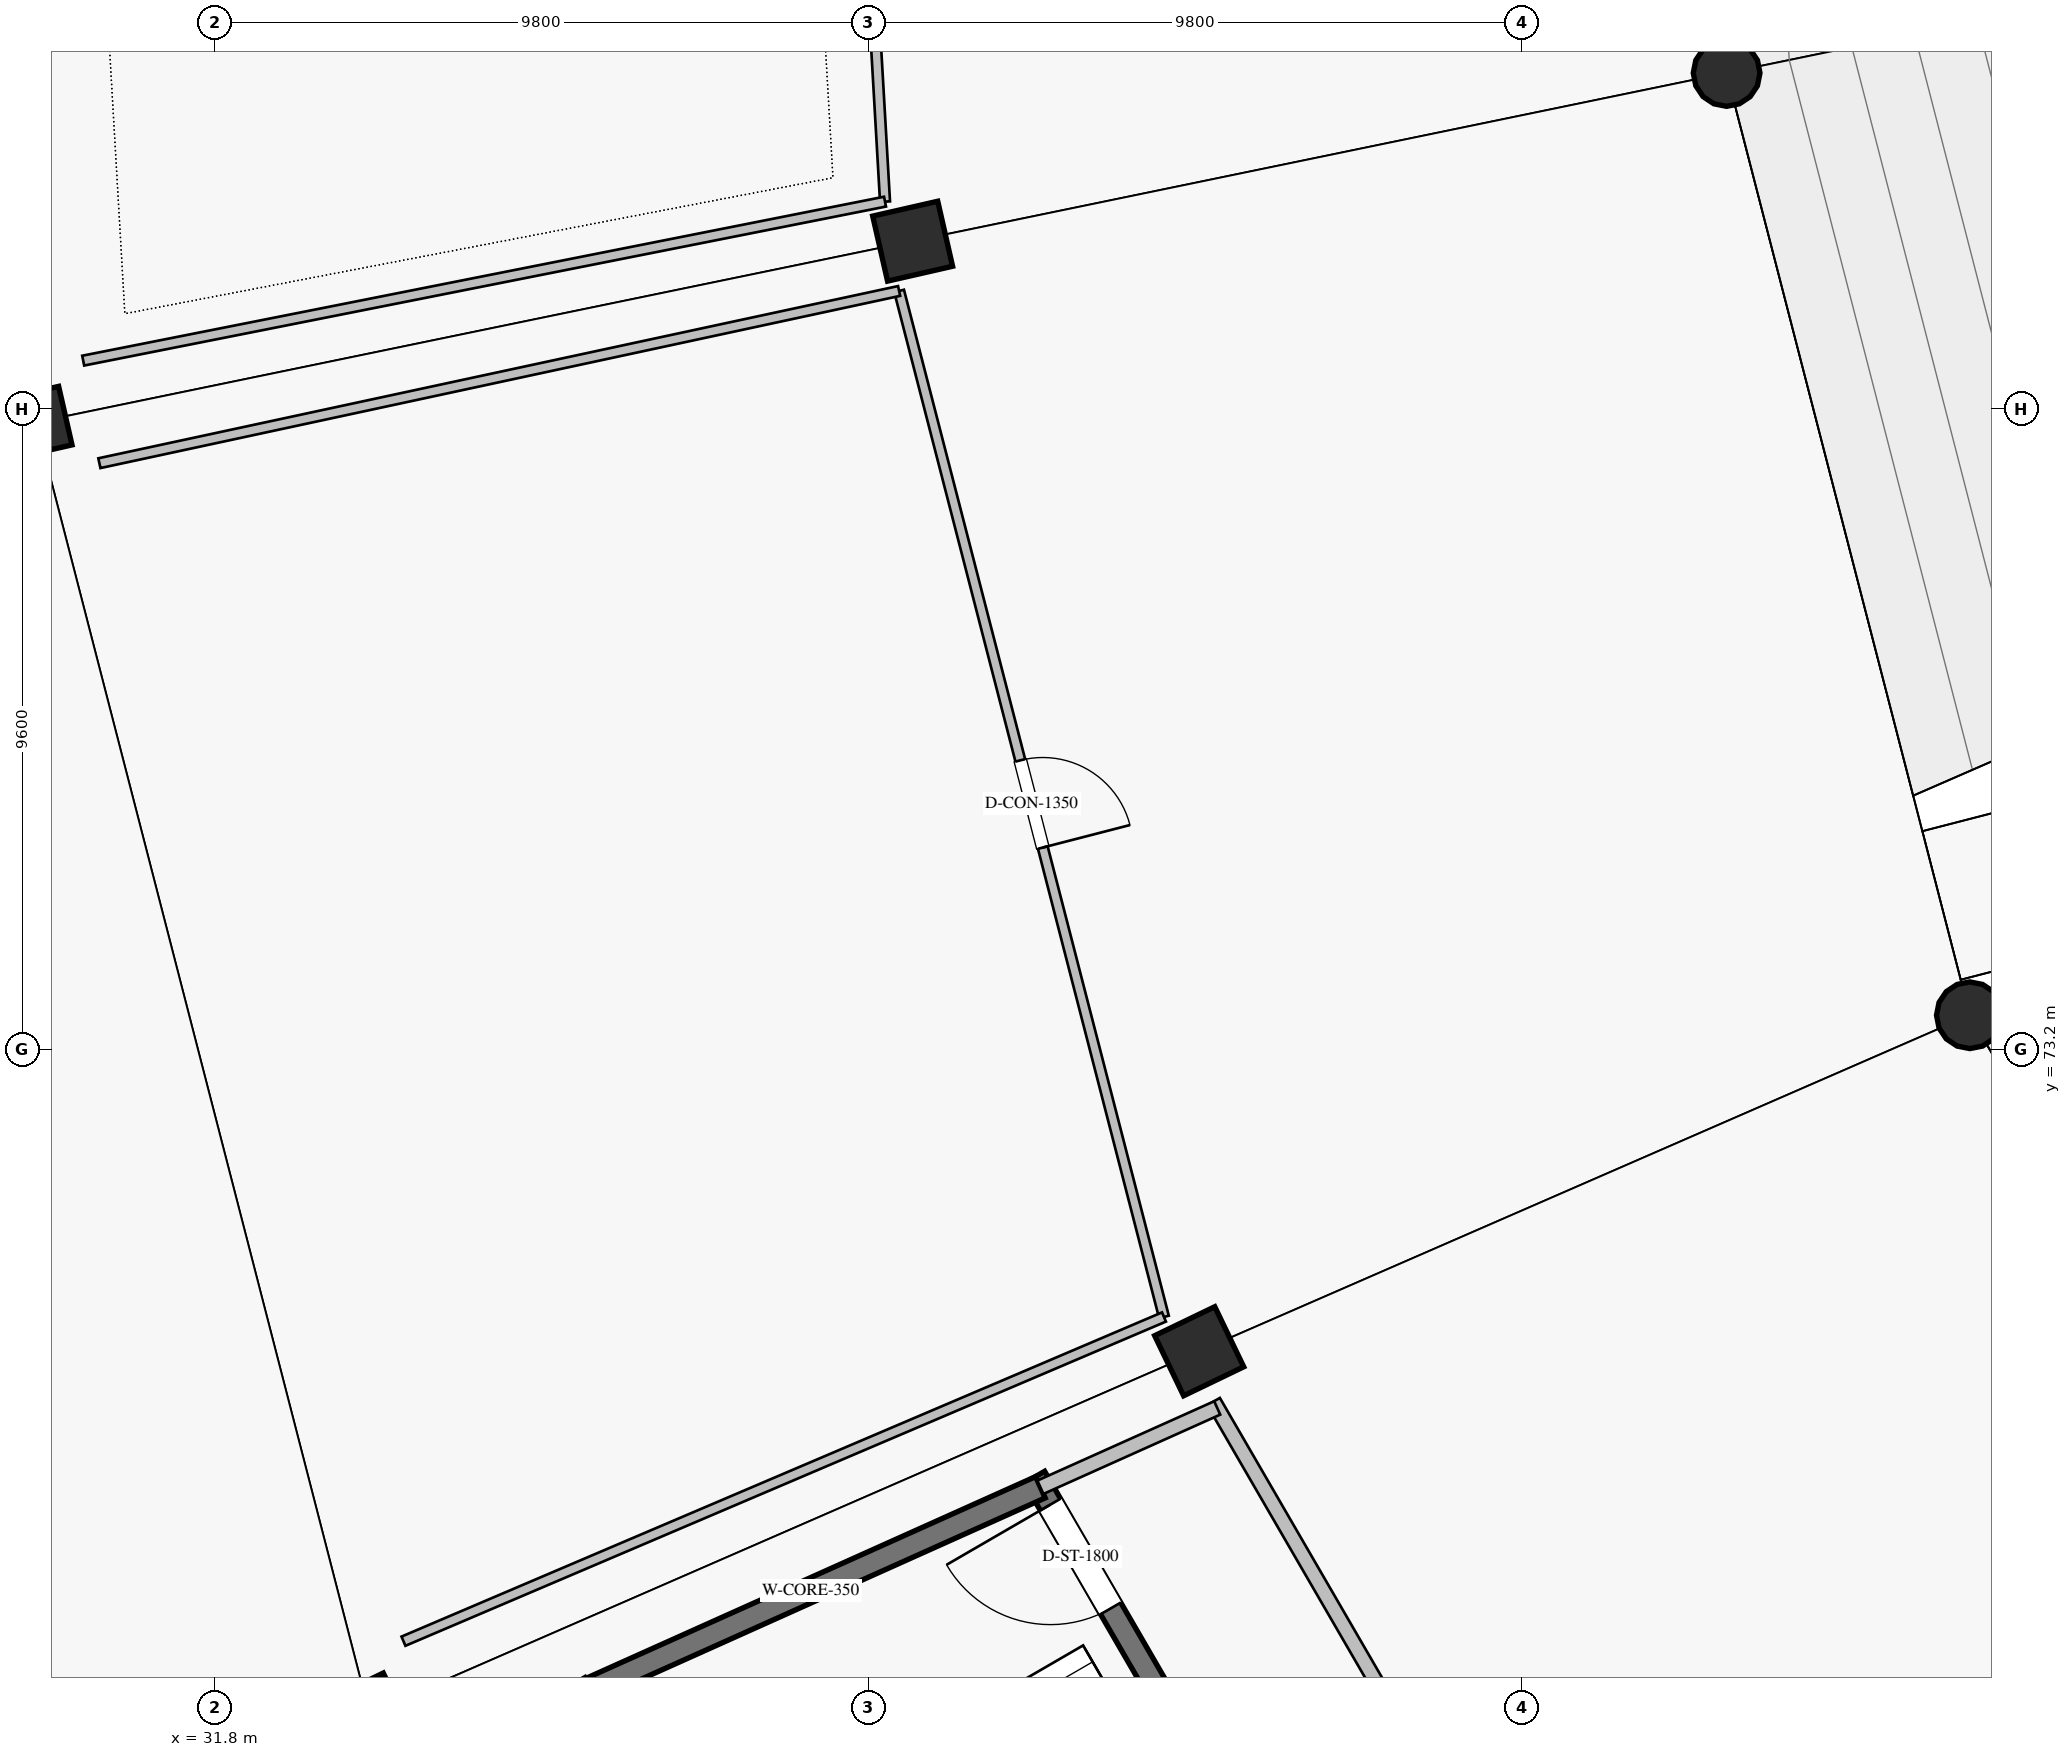
"""IFC4 building model, lengths in metres.
Left out: names, types, materials, properties, quantities, classifications, styles, units other than length and angle.
Written with IfcOpenShell. Run it as: python <this file> out.ifc"""

import sys

from ifc_helpers import new_model, si_unit, direction, frame, frame_2d, origin, origin_2d, place, context, subcontext, project, spatial, rectangle, circle, extrude, element, fill, save


model = new_model("IFC4")
c1 = context("Model", 3, precision=1e-05, world=origin(), true_north=direction((0.0, 1.0)))
c2 = subcontext(c1, "Body", "Model", "MODEL_VIEW")
j1 = project(units=[si_unit("LENGTHUNIT", "METRE"), si_unit("PLANEANGLEUNIT", "RADIAN")], contexts=[c1])
p1 = place(None, origin())
s1 = spatial("IfcSite", under=j1, at=p1, CompositionType="ELEMENT")
p2 = place(p1, origin())
s2 = spatial("IfcBuilding", under=s1, at=p2, CompositionType="ELEMENT")
p3 = place(p2, frame((0.0, 0.0, 5.78)))
s3 = spatial("IfcBuildingStorey", under=s2, at=p3, CompositionType="ELEMENT", Elevation=5.78)
for number, where, z_axis, x_axis in (
    (1, (54.467, 87.84, 0.0), (0.0, 0.0, 1.0), (-0.975, -0.223, 0.0)),
    (2, (58.114, 73.713, 0.0), (0.0, 0.0, 1.0), (-0.901, -0.434, 0.0)),
):
    element("IfcColumn", number, at=place(p3, frame(where, z_axis=z_axis, x_axis=x_axis)), inside=s3, PredefinedType="COLUMN", context=c2, shape_type="SweptSolid", body=[
        extrude(circle(Radius=0.5, at=origin_2d()), origin(), (0.0, 0.0, 1.0), 4.76),
    ])
for number, where, z_axis, x_axis in (
    (3, (42.262, 85.318, 0.0), (0.0, 0.0, 1.0), (-0.975, -0.223, 0.0)),
    (4, (46.559, 68.675, 0.0), (0.0, 0.0, 1.0), (-0.901, -0.434, 0.0)),
):
    element("IfcColumn", number, at=place(p3, frame(where, z_axis=z_axis, x_axis=x_axis)), inside=s3, PredefinedType="COLUMN", context=c2, shape_type="SweptSolid", body=[
        extrude(rectangle(XDim=1.0, YDim=1.0, at=origin_2d()), origin(), (0.0, 0.0, 1.0), 4.76),
    ])
for number, where, z_axis, x_axis in (
    (5, (29.119, 82.602, 0.0), (0.0, 0.0, 1.0), (-0.975, -0.223, 0.0)),
    (6, (34.115, 63.25, 0.0), (0.0, 0.0, 1.0), (-0.901, -0.434, 0.0)),
):
    element("IfcColumn", number, at=place(p3, frame(where, z_axis=z_axis, x_axis=x_axis)), inside=s3, PredefinedType="COLUMN", context=c2, shape_type="SweptSolid", body=[
        extrude(rectangle(XDim=0.9, YDim=0.9, at=origin_2d()), origin(), (0.0, 0.0, 1.0), 4.76),
    ])
p4 = place(p3, frame((44.09, 66.788, 0.0), z_axis=(0.0, 0.0, 1.0), x_axis=(0.501628624814, -0.865083072755, 0.0)))
e7 = element("IfcWall", 7, at=p4, inside=s3, PredefinedType="SHEAR", context=c2, shape_type="SweptSolid", body=[
    extrude(rectangle(XDim=11.435, YDim=0.35, at=frame_2d((5.718, 0.0))), origin(), (0.0, 0.0, 1.0), 4.5),
])
p5 = place(p4, frame((0.475, 0.0, 0.0)))
e8 = element("IfcOpeningElement", 8, at=p5, cuts=e7, PredefinedType="OPENING", context=c2, shape_type="SweptSolid", body=[
    extrude(rectangle(XDim=1.8, YDim=2.2, at=frame_2d((0.9, 1.1))), frame((0.0, 0.185, 0.0), z_axis=(0.0, -1.0, 0.0), x_axis=(1.0, 0.0, 0.0)), (0.0, 0.0, 1.0), 0.37),
])
p6 = place(p3, frame((44.178, 66.636, 0.0), z_axis=(0.0, 0.0, 1.0), x_axis=(-0.912385324524, -0.409332407212, 0.0)))
e9 = element("IfcWall", 9, at=p6, inside=s3, PredefinedType="SHEAR", context=c2, shape_type="SweptSolid", body=[
    extrude(rectangle(XDim=7.554, YDim=0.35, at=frame_2d((3.777, 0.0))), origin(), (0.0, 0.0, 1.0), 4.5),
])
p7 = place(p3, frame((46.774, 67.921, 0.0), z_axis=(0.0, 0.0, 1.0), x_axis=(0.501612626242, -0.865092349518, 0.0)))
e10 = element("IfcWall", 10, at=p7, inside=s3, PredefinedType="SOLIDWALL", context=c2, shape_type="SweptSolid", body=[
    extrude(rectangle(XDim=16.11, YDim=0.22, at=frame_2d((8.055, 0.0))), origin(), (0.0, 0.0, 1.0), 3.448),
])
p8 = place(p7, frame((6.511, 0.0, 0.0)))
e11 = element("IfcOpeningElement", 11, at=p8, cuts=e10, PredefinedType="OPENING", context=c2, shape_type="SweptSolid", body=[
    extrude(rectangle(XDim=1.5, YDim=2.2, at=frame_2d((0.75, 1.1))), frame((0.0, 0.12, 0.0), z_axis=(0.0, -1.0, 0.0), x_axis=(1.0, 0.0, 0.0)), (0.0, 0.0, 1.0), 0.24),
])
p9 = place(p3, frame((46.829, 67.826, 0.0), z_axis=(0.0, 0.0, 1.0), x_axis=(-0.912378422162, -0.409347791949, 0.0)))
e12 = element("IfcWall", 12, at=p9, inside=s3, PredefinedType="SOLIDWALL", context=c2, shape_type="SweptSolid", body=[
    extrude(rectangle(XDim=2.906, YDim=0.22, at=frame_2d((1.453, 0.0))), origin(), (0.0, 0.0, 1.0), 4.5),
])
p10 = place(p3, frame((40.959, 101.33, 0.0), z_axis=(0.0, 0.0, 1.0), x_axis=(0.057603503798, -0.998339539611, 0.0)))
e13 = element("IfcWall", 13, at=p10, inside=s3, PredefinedType="PARTITIONING", context=c2, shape_type="SweptSolid", body=[
    extrude(rectangle(XDim=15.444, YDim=0.15, at=frame_2d((7.722, 0.0))), origin(), (0.0, 0.0, 1.0), 3.82),
])
p11 = place(p10, frame((7.247, 0.0, 0.0)))
e14 = element("IfcOpeningElement", 14, at=p11, cuts=e13, PredefinedType="OPENING", context=c2, shape_type="SweptSolid", body=[
    extrude(rectangle(XDim=0.95, YDim=2.15, at=frame_2d((0.475, 1.075))), frame((0.0, 0.085, 0.0), z_axis=(0.0, -1.0, 0.0), x_axis=(1.0, 0.0, 0.0)), (0.0, 0.0, 1.0), 0.17),
])
p12 = place(p3, frame((41.848, 85.911, 0.0), z_axis=(0.0, 0.0, 1.0), x_axis=(-0.980904167784, -0.194491680088, 0.0)))
e15 = element("IfcWall", 15, at=p12, inside=s3, PredefinedType="PARTITIONING", context=c2, shape_type="SweptSolid", body=[
    extrude(rectangle(XDim=12.257, YDim=0.15, at=frame_2d((6.128, 0.0))), origin(), (0.0, 0.0, 1.0), 3.82),
])
p13 = place(p3, frame((42.06, 84.572, 0.0), z_axis=(0.0, 0.0, 1.0), x_axis=(0.249970043824, -0.968253570709, 0.0)))
e16 = element("IfcWall", 16, at=p13, inside=s3, PredefinedType="PARTITIONING", context=c2, shape_type="SweptSolid", body=[
    extrude(rectangle(XDim=15.887, YDim=0.15, at=frame_2d((7.943, 0.0))), origin(), (0.0, 0.0, 1.0), 3.82),
])
p14 = place(p13, frame((7.268, 0.0, 0.0)))
e17 = element("IfcOpeningElement", 17, at=p14, cuts=e16, PredefinedType="OPENING", context=c2, shape_type="SweptSolid", body=[
    extrude(rectangle(XDim=1.35, YDim=2.15, at=frame_2d((0.675, 1.075))), frame((0.0, 0.085, 0.0), z_axis=(0.0, -1.0, 0.0), x_axis=(1.0, 0.0, 0.0)), (0.0, 0.0, 1.0), 0.17),
])
p15 = place(p3, frame((42.06, 84.572, 0.0), z_axis=(0.0, 0.0, 1.0), x_axis=(-0.97759337709, -0.210502230558, 0.0)))
e18 = element("IfcWall", 18, at=p15, inside=s3, PredefinedType="PARTITIONING", context=c2, shape_type="SweptSolid", body=[
    extrude(rectangle(XDim=12.266, YDim=0.15, at=frame_2d((6.133, 0.0))), origin(), (0.0, 0.0, 1.0), 3.82),
])
p16 = place(p3, frame((46.031, 69.189, 0.0), z_axis=(0.0, 0.0, 1.0), x_axis=(-0.919905328402, -0.392140519173, 0.0)))
e19 = element("IfcWall", 19, at=p16, inside=s3, PredefinedType="PARTITIONING", context=c2, shape_type="SweptSolid", body=[
    extrude(rectangle(XDim=12.396, YDim=0.15, at=frame_2d((6.198, 0.0))), origin(), (0.0, 0.0, 1.0), 3.82),
])
p17 = place(p5, frame((1.8, 0.0, 0.0), z_axis=(0.0, 0.0, 1.0), x_axis=(-1.0, 0.0, 0.0)))
e20 = element("IfcDoor", 20, at=p17, inside=s3, OperationType="SINGLE_SWING_RIGHT", PredefinedType="DOOR", context=c2, shape_type="SweptSolid", body=[
    extrude(rectangle(XDim=1.8, YDim=2.2, at=frame_2d((0.9, 1.1))), frame((0.0, 0.025, 0.0), z_axis=(0.0, -1.0, 0.0), x_axis=(1.0, 0.0, 0.0)), (0.0, 0.0, 1.0), 0.05),
])
fill(e8, e20)
p18 = place(p14, origin())
e21 = element("IfcDoor", 21, at=p18, inside=s3, OperationType="SINGLE_SWING_RIGHT", PredefinedType="DOOR", context=c2, shape_type="SweptSolid", body=[
    extrude(rectangle(XDim=1.35, YDim=2.15, at=frame_2d((0.675, 1.075))), frame((0.0, 0.025, 0.0), z_axis=(0.0, -1.0, 0.0), x_axis=(1.0, 0.0, 0.0)), (0.0, 0.0, 1.0), 0.05),
])
fill(e17, e21)
save(model, sys.argv[1])
